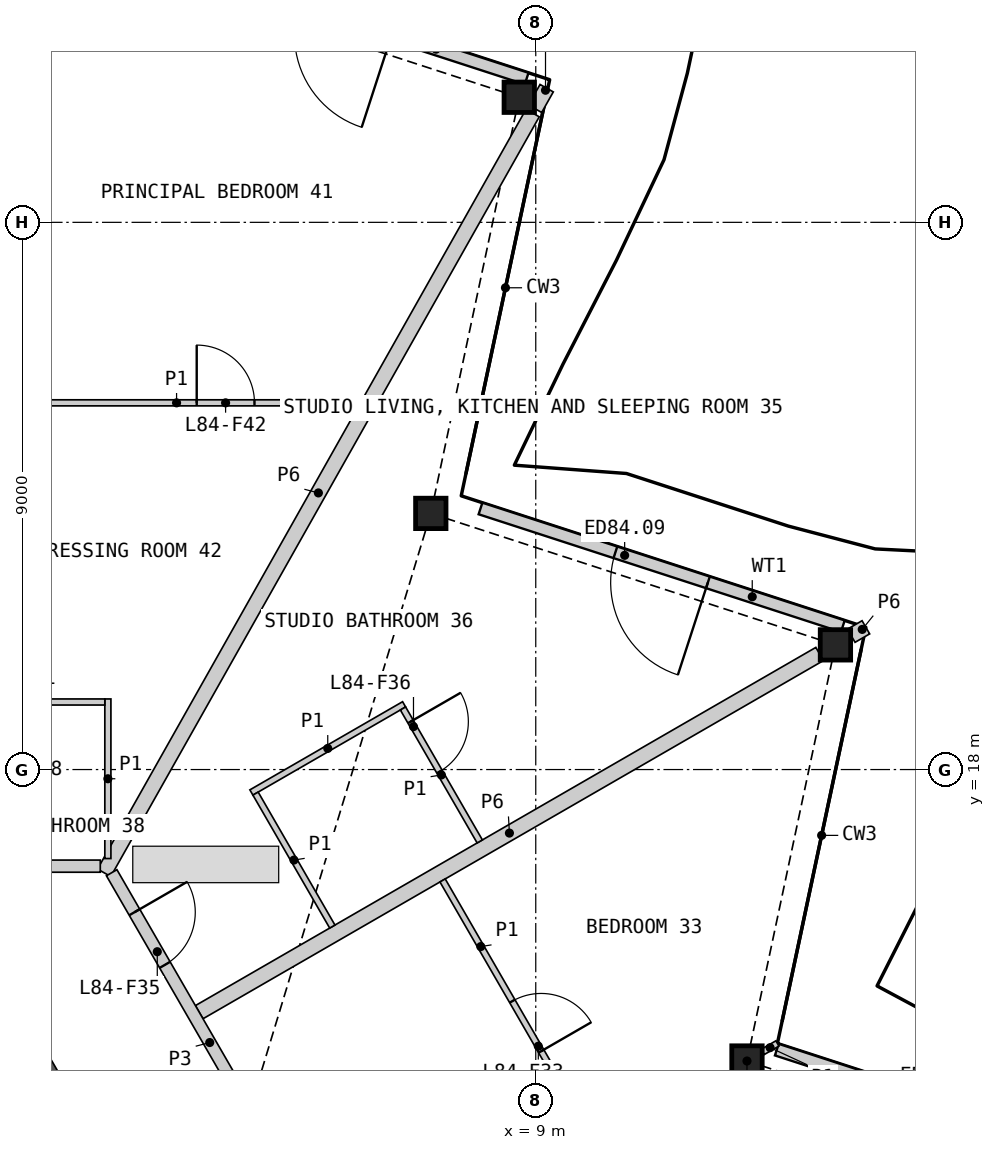
"""IFC4 building model, lengths in metres.
Left out: names, types, materials, properties, quantities, classifications, styles, units other than length and angle.
Written with IfcOpenShell. Run it as: python <this file> out.ifc"""

import sys

from ifc_helpers import new_model, si_unit, direction, frame, frame_2d, origin, origin_2d, place, context, subcontext, project, spatial, rectangle, hollow_rectangle, extrude, element, fill, save


model = new_model("IFC4")
c1 = context("Model", 3, precision=1e-05, world=origin(), true_north=direction((0.0, 1.0)))
c2 = subcontext(c1, "Body", "Model", "MODEL_VIEW")
j1 = project(units=[si_unit("LENGTHUNIT", "METRE"), si_unit("PLANEANGLEUNIT", "RADIAN")], contexts=[c1])
p1 = place(None, origin())
s1 = spatial("IfcSite", under=j1, at=p1, CompositionType="ELEMENT")
p2 = place(p1, origin())
s2 = spatial("IfcBuilding", under=s1, at=p2, CompositionType="ELEMENT")
p3 = place(p2, frame((0.0, 0.0, 374.6)))
s3 = spatial("IfcBuildingStorey", under=s2, at=p3, CompositionType="ELEMENT", Elevation=374.6)
for number, where, z_axis, x_axis in (
    (1, (12.474, 13.206, 0.0), (0.0, 0.0, 1.0), (1.0, 0.0, 0.0)),
    (2, (13.929, 20.051, 0.0), (0.0, 0.0, 1.0), (1.0, 0.0, 0.0)),
    (3, (7.274, 22.213, 0.0), (0.0, 0.0, 1.0), (1.0, 0.0, 0.0)),
    (4, (8.729, 29.057, 0.0), (0.0, 0.0, 1.0), (1.0, 0.0, 0.0)),
):
    element("IfcColumn", number, at=place(p3, frame(where, z_axis=z_axis, x_axis=x_axis)), inside=s3, PredefinedType="COLUMN", context=c2, shape_type="SweptSolid", body=[
        extrude(hollow_rectangle(XDim=0.5, YDim=0.5, WallThickness=0.03, at=origin_2d()), origin(), (0.0, 0.0, 1.0), 3.4),
    ])
p4 = place(p3, frame((19.25, 11.351, 0.0), z_axis=(0.0, 0.0, 1.0), x_axis=(-0.951060668786, 0.309004214029, 0.0)))
e5 = element("IfcWall", 5, at=p4, inside=s3, PredefinedType="SOLIDWALL", context=c2, shape_type="SweptSolid", body=[
    extrude(rectangle(XDim=6.609, YDim=0.2, at=frame_2d((3.305, 0.0))), origin(), (0.0, 0.0, 1.0), 2.634),
])
p5 = place(p4, frame((2.333, 0.0, 0.0)))
e6 = element("IfcOpeningElement", 6, at=p5, cuts=e5, PredefinedType="OPENING", context=c2, shape_type="SweptSolid", body=[
    extrude(rectangle(XDim=1.6, YDim=2.25, at=frame_2d((0.8, 1.125))), frame((0.0, 0.11, 0.0), z_axis=(0.0, -1.0, 0.0), x_axis=(1.0, 0.0, 0.0)), (0.0, 0.0, 1.0), 0.22),
])
p6 = place(p3, frame((14.05, 20.357, 0.0), z_axis=(0.0, 0.0, 1.0), x_axis=(-0.951060123915, 0.309005891041, 0.0)))
e7 = element("IfcWall", 7, at=p6, inside=s3, PredefinedType="SOLIDWALL", context=c2, shape_type="SweptSolid", body=[
    extrude(rectangle(XDim=6.265, YDim=0.2, at=frame_2d((3.133, 0.0))), origin(), (0.0, 0.0, 1.0), 2.634),
])
p7 = place(p6, frame((2.333, 0.0, 0.0)))
e8 = element("IfcOpeningElement", 8, at=p7, cuts=e7, PredefinedType="OPENING", context=c2, shape_type="SweptSolid", body=[
    extrude(rectangle(XDim=1.6, YDim=2.25, at=frame_2d((0.8, 1.125))), frame((0.0, 0.11, 0.0), z_axis=(0.0, -1.0, 0.0), x_axis=(1.0, 0.0, 0.0)), (0.0, 0.0, 1.0), 0.22),
])
p8 = place(p3, frame((8.85, 29.364, 0.0), z_axis=(0.0, 0.0, 1.0), x_axis=(-0.951048671744, 0.309041136379, 0.0)))
e9 = element("IfcWall", 9, at=p8, inside=s3, PredefinedType="SOLIDWALL", context=c2, shape_type="SweptSolid", body=[
    extrude(rectangle(XDim=6.265, YDim=0.2, at=frame_2d((3.133, 0.0))), origin(), (0.0, 0.0, 1.0), 2.634),
])
p9 = place(p8, frame((2.333, 0.0, 0.0)))
e10 = element("IfcOpeningElement", 10, at=p9, cuts=e9, PredefinedType="OPENING", context=c2, shape_type="SweptSolid", body=[
    extrude(rectangle(XDim=1.6, YDim=2.25, at=frame_2d((0.8, 1.125))), frame((0.0, 0.11, 0.0), z_axis=(0.0, -1.0, 0.0), x_axis=(1.0, 0.0, 0.0)), (0.0, 0.0, 1.0), 0.22),
])
p10 = place(p3, frame((8.686, -0.634, 0.0), z_axis=(0.0, 0.0, 1.0), x_axis=(-0.500004601921, 0.866022746848, 0.0)))
e11 = element("IfcWall", 11, at=p10, inside=s3, PredefinedType="SHEAR", context=c2, shape_type="SweptSolid", body=[
    extrude(rectangle(XDim=16.853, YDim=0.6, at=frame_2d((8.426, 0.0))), origin(), (0.0, 0.0, 1.0), 3.1),
])
p11 = place(p3, frame((1.902, 16.302, 0.0), z_axis=(0.0, 0.0, 1.0), x_axis=(0.491233789602, 0.871027763021, 0.0)))
e12 = element("IfcWall", 12, at=p11, inside=s3, PredefinedType="PARTITIONING", context=c2, shape_type="SweptSolid", body=[
    extrude(rectangle(XDim=14.345, YDim=0.25, at=frame_2d((7.173, 0.0))), origin(), (0.0, 0.0, 1.0), 2.33),
])
p12 = place(p3, frame((3.465, 14.01, 0.0), z_axis=(0.0, 0.0, 1.0), x_axis=(0.866032376801, 0.499987922186, 0.0)))
e13 = element("IfcWall", 13, at=p12, inside=s3, PredefinedType="PARTITIONING", context=c2, shape_type="SweptSolid", body=[
    extrude(rectangle(XDim=11.782, YDim=0.25, at=frame_2d((5.891, 0.0))), origin(), (0.0, 0.0, 1.0), 2.33),
])
p13 = place(p3, frame((2.025, 16.303, 0.0), z_axis=(0.0, 0.0, 1.0), x_axis=(0.500004215162, -0.866022970146, 0.0)))
e14 = element("IfcWall", 14, at=p13, inside=s3, PredefinedType="PARTITIONING", context=c2, shape_type="SweptSolid", body=[
    extrude(rectangle(XDim=4.3, YDim=0.2, at=frame_2d((2.15, 0.0))), origin(), (0.0, 0.0, 1.0), 3.1),
])
p14 = place(p13, frame((0.75, 0.0, 0.0)))
e15 = element("IfcOpeningElement", 15, at=p14, cuts=e14, PredefinedType="OPENING", context=c2, shape_type="SweptSolid", body=[
    extrude(rectangle(XDim=1.0, YDim=2.1, at=frame_2d((0.5, 1.05))), frame((0.0, 0.11, 0.0), z_axis=(0.0, -1.0, 0.0), x_axis=(1.0, 0.0, 0.0)), (0.0, 0.0, 1.0), 0.22),
])
p15 = place(p3, frame((-1.863, 16.411, 0.0), z_axis=(0.0, 0.0, 1.0), x_axis=(1.0, 0.0, 0.0)))
e16 = element("IfcWall", 16, at=p15, inside=s3, PredefinedType="PARTITIONING", context=c2, shape_type="SweptSolid", body=[
    extrude(rectangle(XDim=3.701, YDim=0.2, at=frame_2d((1.851, 0.0))), origin(), (0.0, 0.0, 1.0), 3.1),
])
p16 = place(p15, frame((0.25, 0.0, 0.0)))
e17 = element("IfcOpeningElement", 17, at=p16, cuts=e16, PredefinedType="OPENING", context=c2, shape_type="SweptSolid", body=[
    extrude(rectangle(XDim=1.0, YDim=2.1, at=frame_2d((0.5, 1.05))), frame((0.0, 0.11, 0.0), z_axis=(0.0, -1.0, 0.0), x_axis=(1.0, 0.0, 0.0)), (0.0, 0.0, 1.0), 0.22),
])
p17 = place(p3, frame((8.989, 28.868, 0.0), z_axis=(0.0, 0.0, 1.0), x_axis=(0.491394522511, 0.870937094885, 0.0)))
e18 = element("IfcWall", 18, at=p17, inside=s3, PredefinedType="PARTITIONING", context=c2, shape_type="SweptSolid", body=[
    extrude(rectangle(XDim=0.388, YDim=0.25, at=frame_2d((0.194, 0.0))), origin(), (0.0, 0.0, 1.0), 2.33),
])
p18 = place(p3, frame((14.189, 20.201, 0.0), z_axis=(0.0, 0.0, 1.0), x_axis=(0.865687176694, 0.50058536945, 0.0)))
e19 = element("IfcWall", 19, at=p18, inside=s3, PredefinedType="PARTITIONING", context=c2, shape_type="SweptSolid", body=[
    extrude(rectangle(XDim=0.278, YDim=0.25, at=frame_2d((0.139, 0.0))), origin(), (0.0, 0.0, 1.0), 2.33),
])
p19 = place(p3, frame((0.05, 24.031, 0.0), z_axis=(0.0, 0.0, 1.0), x_axis=(1.0, 0.0, 0.0)))
e20 = element("IfcWall", 20, at=p19, inside=s3, PredefinedType="PARTITIONING", context=c2, shape_type="SweptSolid", body=[
    extrude(rectangle(XDim=6.086, YDim=0.1, at=frame_2d((3.043, 0.0))), origin(), (0.0, 0.0, 1.0), 2.33),
])
p20 = place(p19, frame((3.374, 0.0, 0.0)))
e21 = element("IfcOpeningElement", 21, at=p20, cuts=e20, PredefinedType="OPENING", context=c2, shape_type="SweptSolid", body=[
    extrude(rectangle(XDim=0.95, YDim=2.1, at=frame_2d((0.475, 1.05))), frame((0.0, 0.06, 0.0), z_axis=(0.0, -1.0, 0.0), x_axis=(1.0, 0.0, 0.0)), (0.0, 0.0, 1.0), 0.12),
])
p21 = place(p3, frame((7.468, 16.176, 0.0), z_axis=(0.0, 0.0, 1.0), x_axis=(0.499990214365, -0.86603105345, 0.0)))
e22 = element("IfcWall", 22, at=p21, inside=s3, PredefinedType="PARTITIONING", context=c2, shape_type="SweptSolid", body=[
    extrude(rectangle(XDim=5.025, YDim=0.1, at=frame_2d((2.512, 0.0))), origin(), (0.0, 0.0, 1.0), 2.33),
])
p22 = place(p21, frame((2.293, 0.0, 0.0)))
e23 = element("IfcOpeningElement", 23, at=p22, cuts=e22, PredefinedType="OPENING", context=c2, shape_type="SweptSolid", body=[
    extrude(rectangle(XDim=0.95, YDim=2.1, at=frame_2d((0.475, 1.05))), frame((0.0, 0.06, 0.0), z_axis=(0.0, -1.0, 0.0), x_axis=(1.0, 0.0, 0.0)), (0.0, 0.0, 1.0), 0.12),
])
p23 = place(p3, frame((4.323, 17.623, 0.0), z_axis=(0.0, 0.0, 1.0), x_axis=(0.866032775405, 0.499987231761, 0.0)))
e24 = element("IfcWall", 24, at=p23, inside=s3, PredefinedType="PARTITIONING", context=c2, shape_type="SweptSolid", body=[
    extrude(rectangle(XDim=2.9, YDim=0.1, at=frame_2d((1.45, 0.0))), origin(), (0.0, 0.0, 1.0), 2.33),
])
p24 = place(p3, frame((1.963, 16.536, 0.0), z_axis=(0.0, 0.0, 1.0), x_axis=(0.0, 1.0, 0.0)))
e25 = element("IfcWall", 25, at=p24, inside=s3, PredefinedType="PARTITIONING", context=c2, shape_type="SweptSolid", body=[
    extrude(rectangle(XDim=2.625, YDim=0.1, at=frame_2d((1.312, 0.0))), origin(), (0.0, 0.0, 1.0), 2.33),
])
p25 = place(p3, frame((6.817, 19.004, 0.0), z_axis=(0.0, 0.0, 1.0), x_axis=(0.499976333282, -0.866039067339, 0.0)))
e26 = element("IfcWall", 26, at=p25, inside=s3, PredefinedType="PARTITIONING", context=c2, shape_type="SweptSolid", body=[
    extrude(rectangle(XDim=2.525, YDim=0.1, at=frame_2d((1.262, 0.0))), origin(), (0.0, 0.0, 1.0), 2.33),
])
p26 = place(p25, frame((0.25, 0.0, 0.0)))
e27 = element("IfcOpeningElement", 27, at=p26, cuts=e26, PredefinedType="OPENING", context=c2, shape_type="SweptSolid", body=[
    extrude(rectangle(XDim=0.95, YDim=2.1, at=frame_2d((0.475, 1.05))), frame((0.0, 0.06, 0.0), z_axis=(0.0, -1.0, 0.0), x_axis=(1.0, 0.0, 0.0)), (0.0, 0.0, 1.0), 0.12),
])
p27 = place(p3, frame((4.392, 17.604, 0.0), z_axis=(0.0, 0.0, 1.0), x_axis=(0.500048846702, -0.865997200291, 0.0)))
e28 = element("IfcWall", 28, at=p27, inside=s3, PredefinedType="PARTITIONING", context=c2, shape_type="SweptSolid", body=[
    extrude(rectangle(XDim=2.525, YDim=0.1, at=frame_2d((1.263, 0.0))), origin(), (0.0, 0.0, 1.0), 2.33),
])
p28 = place(p3, frame((-0.06, 19.111, 0.0), z_axis=(0.0, 0.0, 1.0), x_axis=(1.0, 0.0, 0.0)))
e29 = element("IfcWall", 29, at=p28, inside=s3, PredefinedType="PARTITIONING", context=c2, shape_type="SweptSolid", body=[
    extrude(rectangle(XDim=1.973, YDim=0.1, at=frame_2d((0.987, 0.0))), origin(), (0.0, 0.0, 1.0), 2.33),
])
p29 = place(p3, frame((12.734, 13.356, 0.0), z_axis=(0.0, 0.0, 1.0), x_axis=(0.865687176694, 0.50058536945, 0.0)))
e30 = element("IfcWall", 30, at=p29, inside=s3, PredefinedType="PARTITIONING", context=c2, shape_type="SweptSolid", body=[
    extrude(rectangle(XDim=0.278, YDim=0.1, at=frame_2d((0.139, 0.0))), origin(), (0.0, 0.0, 1.0), 2.33),
])
p30 = place(p7, origin())
e31 = element("IfcDoor", 31, at=p30, inside=s3, OperationType="DOUBLE_DOOR_SINGLE_SWING", PredefinedType="DOOR", context=c2, shape_type="SweptSolid", body=[
    extrude(rectangle(XDim=1.6, YDim=2.25, at=frame_2d((0.8, 1.125))), frame((0.0, 0.025, 0.0), z_axis=(0.0, -1.0, 0.0), x_axis=(1.0, 0.0, 0.0)), (0.0, 0.0, 1.0), 0.05),
])
fill(e8, e31)
p31 = place(p22, origin())
e32 = element("IfcDoor", 32, at=p31, inside=s3, OperationType="SINGLE_SWING_RIGHT", PredefinedType="DOOR", context=c2, shape_type="SweptSolid", body=[
    extrude(rectangle(XDim=0.95, YDim=2.1, at=frame_2d((0.475, 1.05))), frame((0.0, 0.025, 0.0), z_axis=(0.0, -1.0, 0.0), x_axis=(1.0, 0.0, 0.0)), (0.0, 0.0, 1.0), 0.05),
])
fill(e23, e32)
p32 = place(p14, origin())
e33 = element("IfcDoor", 33, at=p32, inside=s3, OperationType="SINGLE_SWING_LEFT", PredefinedType="DOOR", context=c2, shape_type="SweptSolid", body=[
    extrude(rectangle(XDim=1.0, YDim=2.1, at=frame_2d((0.5, 1.05))), frame((0.0, 0.025, 0.0), z_axis=(0.0, -1.0, 0.0), x_axis=(1.0, 0.0, 0.0)), (0.0, 0.0, 1.0), 0.05),
])
fill(e15, e33)
p33 = place(p26, origin())
e34 = element("IfcDoor", 34, at=p33, inside=s3, OperationType="SINGLE_SWING_LEFT", PredefinedType="DOOR", context=c2, shape_type="SweptSolid", body=[
    extrude(rectangle(XDim=0.95, YDim=2.1, at=frame_2d((0.475, 1.05))), frame((0.0, 0.025, 0.0), z_axis=(0.0, -1.0, 0.0), x_axis=(1.0, 0.0, 0.0)), (0.0, 0.0, 1.0), 0.05),
])
fill(e27, e34)
p34 = place(p20, origin())
e35 = element("IfcDoor", 35, at=p34, inside=s3, OperationType="SINGLE_SWING_LEFT", PredefinedType="DOOR", context=c2, shape_type="SweptSolid", body=[
    extrude(rectangle(XDim=0.95, YDim=2.1, at=frame_2d((0.475, 1.05))), frame((0.0, 0.025, 0.0), z_axis=(0.0, -1.0, 0.0), x_axis=(1.0, 0.0, 0.0)), (0.0, 0.0, 1.0), 0.05),
])
fill(e21, e35)
save(model, sys.argv[1])
